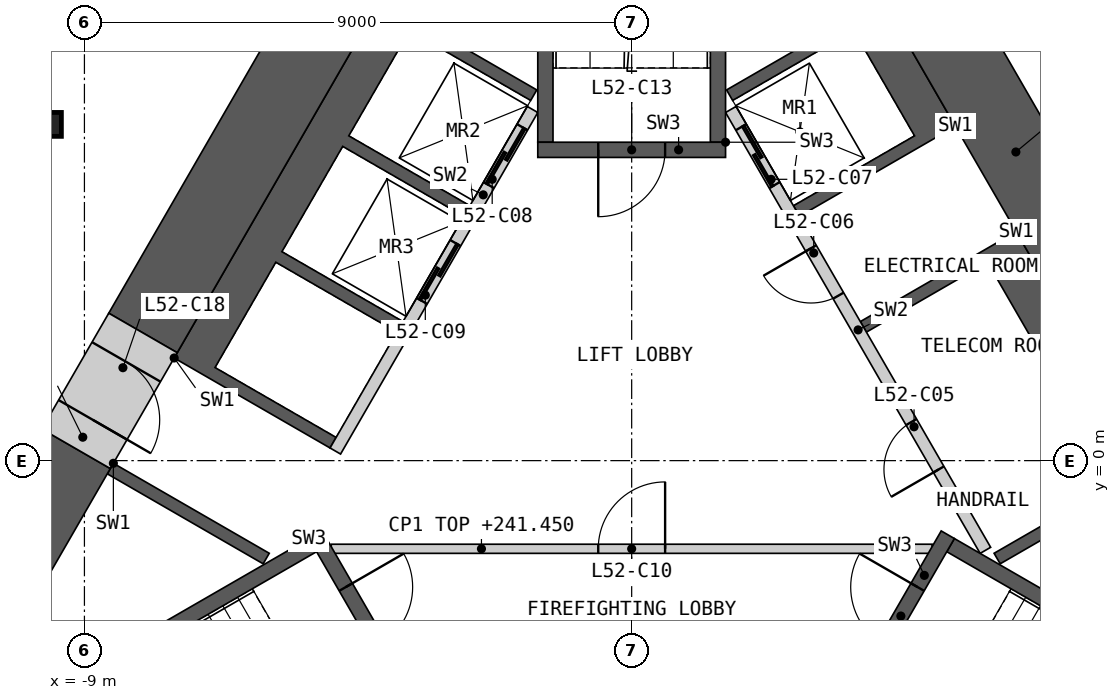
"""IFC4 building model, lengths in metres.
Left out: names, types, materials, properties, quantities, classifications, styles, units other than length and angle.
Written with IfcOpenShell. Run it as: python <this file> out.ifc"""

import sys

from ifc_helpers import new_model, si_unit, direction, frame, frame_2d, origin, origin_2d, place, context, subcontext, project, spatial, polyline, rectangle, i_section, outline, extrude, element, fill, save


model = new_model("IFC4")
c1 = context("Model", 3, precision=1e-05, world=origin(), true_north=direction((0.0, 1.0)))
c2 = subcontext(c1, "Body", "Model", "MODEL_VIEW")
j1 = project(units=[si_unit("LENGTHUNIT", "METRE"), si_unit("PLANEANGLEUNIT", "RADIAN")], contexts=[c1])
p1 = place(None, origin())
s1 = spatial("IfcSite", under=j1, at=p1, CompositionType="ELEMENT")
p2 = place(p1, origin())
s2 = spatial("IfcBuilding", under=s1, at=p2, CompositionType="ELEMENT")
p3 = place(p2, frame((0.0, 0.0, 238.2)))
s3 = spatial("IfcBuildingStorey", under=s2, at=p3, CompositionType="ELEMENT", Elevation=238.2)
p4 = place(p3, frame((-9.578, 5.53, 0.0), z_axis=(0.0, 0.0, 1.0), x_axis=(1.0, 0.0, 0.0)))
e1 = element("IfcColumn", 1, at=p4, inside=s3, PredefinedType="COLUMN", context=c2, shape_type="SweptSolid", body=[
    extrude(i_section(OverallWidth=0.399, OverallDepth=0.393, WebThickness=0.023, FlangeThickness=0.037, at=origin_2d()), origin(), (0.0, 0.0, 1.0), 3.6),
])
p5 = place(p3, origin())
e2 = element("IfcWall", 2, at=p5, inside=s3, PredefinedType="SHEAR", context=c2, shape_type="SweptSolid", body=[
    extrude(outline(polyline([(6.324, 3.767), (8.624, -0.217), (8.231, -0.444), (6.061, -1.697), (5.96, -1.524), (7.952, -0.374), (5.852, 3.263), (3.861, 2.113), (3.76, 2.287), (5.931, 3.54), (6.324, 3.767)])), origin(), (0.0, 0.0, 1.0), 3.25),
])
p6 = place(p3, origin())
e3 = element("IfcWall", 3, at=p6, inside=s3, PredefinedType="SHEAR", context=c2, shape_type="SweptSolid", body=[
    extrude(outline(polyline([(5.324, 5.499), (4.931, 5.272), (2.76, 4.019), (2.66, 4.192), (4.652, 5.342), (3.652, 7.074), (1.66, 5.924), (1.561, 6.097), (3.731, 7.35), (4.124, 7.577), (5.324, 5.499)])), origin(), (0.0, 0.0, 1.0), 3.25),
])
p7 = place(p3, frame((5.817, -1.476, 0.0), z_axis=(0.0, 0.0, 1.0), x_axis=(-0.500002616675, 0.866023893041, 0.0)))
e4 = element("IfcWall", 4, at=p7, inside=s3, PredefinedType="SOLIDWALL", context=c2, shape_type="SweptSolid", body=[
    extrude(rectangle(XDim=8.373, YDim=0.2, at=frame_2d((4.187, 0.0))), origin(), (0.0, 0.0, 1.0), 3.25),
])
p8 = place(p7, frame((1.537, 0.0, 0.0)))
e5 = element("IfcOpeningElement", 5, at=p8, cuts=e4, PredefinedType="OPENING", context=c2, shape_type="SweptSolid", body=[
    extrude(rectangle(XDim=0.9, YDim=2.1, at=frame_2d((0.45, 1.05))), frame((0.0, 0.11, 0.0), z_axis=(0.0, -1.0, 0.0), x_axis=(1.0, 0.0, 0.0)), (0.0, 0.0, 1.0), 0.22),
])
p9 = place(p7, frame((4.837, 0.0, 0.0)))
e6 = element("IfcOpeningElement", 6, at=p9, cuts=e4, PredefinedType="OPENING", context=c2, shape_type="SweptSolid", body=[
    extrude(rectangle(XDim=0.9, YDim=2.1, at=frame_2d((0.45, 1.05))), frame((0.0, 0.11, 0.0), z_axis=(0.0, -1.0, 0.0), x_axis=(1.0, 0.0, 0.0)), (0.0, 0.0, 1.0), 0.22),
])
p10 = place(p7, frame((6.937, 0.0, 0.0)))
e7 = element("IfcOpeningElement", 7, at=p10, cuts=e4, PredefinedType="OPENING", context=c2, shape_type="SweptSolid", body=[
    extrude(rectangle(XDim=1.1, YDim=2.1, at=frame_2d((0.55, 1.05))), frame((0.0, 0.11, 0.0), z_axis=(0.0, -1.0, 0.0), x_axis=(1.0, 0.0, 0.0)), (0.0, 0.0, 1.0), 0.22),
])
p11 = place(p3, origin())
e8 = element("IfcWall", 8, at=p11, inside=s3, PredefinedType="SHEAR", context=c2, shape_type="SweptSolid", body=[
    extrude(outline(polyline([(-7.524, 1.688), (-4.124, 7.577), (-3.731, 7.35), (-1.561, 6.097), (-1.66, 5.924), (-3.652, 7.074), (-4.652, 5.342), (-2.66, 4.192), (-2.76, 4.019), (-4.752, 5.169), (-5.752, 3.437), (-3.76, 2.287), (-3.861, 2.113), (-5.852, 3.263), (-6.852, 1.531), (-4.861, 0.381), (-4.96, 0.208), (-7.131, 1.461), (-7.524, 1.688)])), origin(), (0.0, 0.0, 1.0), 3.25),
])
p12 = place(p3, origin())
e9 = element("IfcWall", 9, at=p12, inside=s3, PredefinedType="SHEAR", context=c2, shape_type="SweptSolid", body=[
    extrude(outline(polyline([(-8.524, -0.044), (-8.131, -0.271), (-5.96, -1.524), (-6.061, -1.697), (-8.231, -0.444), (-8.624, -0.217), (-8.524, -0.044)])), origin(), (0.0, 0.0, 1.0), 3.25),
])
p13 = place(p3, frame((-1.631, 5.776, 0.0), z_axis=(0.0, 0.0, 1.0), x_axis=(-0.499992876559, -0.866029516466, 0.0)))
e10 = element("IfcWall", 10, at=p13, inside=s3, PredefinedType="SOLIDWALL", context=c2, shape_type="SweptSolid", body=[
    extrude(rectangle(XDim=6.486, YDim=0.2, at=frame_2d((3.243, 0.0))), origin(), (0.0, 0.0, 1.0), 3.25),
])
p14 = place(p13, frame((0.337, 0.0, 0.0)))
e11 = element("IfcOpeningElement", 11, at=p14, cuts=e10, PredefinedType="OPENING", context=c2, shape_type="SweptSolid", body=[
    extrude(rectangle(XDim=1.1, YDim=2.1, at=frame_2d((0.55, 1.05))), frame((0.0, 0.11, 0.0), z_axis=(0.0, -1.0, 0.0), x_axis=(1.0, 0.0, 0.0)), (0.0, 0.0, 1.0), 0.22),
])
p15 = place(p13, frame((2.537, 0.0, 0.0)))
e12 = element("IfcOpeningElement", 12, at=p15, cuts=e10, PredefinedType="OPENING", context=c2, shape_type="SweptSolid", body=[
    extrude(rectangle(XDim=1.1, YDim=2.1, at=frame_2d((0.55, 1.05))), frame((0.0, 0.11, 0.0), z_axis=(0.0, -1.0, 0.0), x_axis=(1.0, 0.0, 0.0)), (0.0, 0.0, 1.0), 0.22),
])
p16 = place(p3, frame((-4.941, -1.45, 0.0), z_axis=(0.0, 0.0, 1.0), x_axis=(1.0, 0.0, 0.0)))
e13 = element("IfcWall", 13, at=p16, inside=s3, PredefinedType="PARTITIONING", context=c2, shape_type="SweptSolid", body=[
    extrude(rectangle(XDim=9.882, YDim=0.15, at=frame_2d((4.941, 0.0))), origin(), (0.0, 0.0, 1.0), 3.25),
])
p17 = place(p16, frame((4.391, 0.0, 0.0)))
e14 = element("IfcOpeningElement", 14, at=p17, cuts=e13, PredefinedType="OPENING", context=c2, shape_type="SweptSolid", body=[
    extrude(rectangle(XDim=1.1, YDim=2.1, at=frame_2d((0.55, 1.05))), frame((0.0, 0.085, 0.0), z_axis=(0.0, -1.0, 0.0), x_axis=(1.0, 0.0, 0.0)), (0.0, 0.0, 1.0), 0.17),
])
p18 = place(p3, origin())
e15 = element("IfcWall", 15, at=p18, inside=s3, PredefinedType="SHEAR", context=c2, shape_type="SweptSolid", body=[
    extrude(outline(polyline([(-5.307, -1.281), (-10.374, -4.206), (-10.032, -4.298), (-5.182, -1.498), (-5.307, -1.281)])), origin(), (0.0, 0.0, 1.0), 3.25),
])
p19 = place(p3, frame((-5.199, -1.219, 0.0), z_axis=(0.0, 0.0, 1.0), x_axis=(0.499982516597, -0.866035497597, 0.0)))
e16 = element("IfcWall", 16, at=p19, inside=s3, PredefinedType="SHEAR", context=c2, shape_type="SweptSolid", body=[
    extrude(rectangle(XDim=3.088, YDim=0.25, at=frame_2d((1.544, 0.0))), origin(), (0.0, 0.0, 1.0), 3.25),
])
p20 = place(p19, frame((0.994, 0.0, 0.0)))
e17 = element("IfcOpeningElement", 17, at=p20, cuts=e16, PredefinedType="OPENING", context=c2, shape_type="SweptSolid", body=[
    extrude(rectangle(XDim=1.1, YDim=2.1, at=frame_2d((0.55, 1.05))), frame((0.0, 0.135, 0.0), z_axis=(0.0, -1.0, 0.0), x_axis=(1.0, 0.0, 0.0)), (0.0, 0.0, 1.0), 0.27),
])
p21 = place(p3, origin())
e18 = element("IfcWall", 18, at=p21, inside=s3, PredefinedType="SHEAR", context=c2, shape_type="SweptSolid", body=[
    extrude(outline(polyline([(10.032, -4.298), (10.374, -4.206), (5.307, -1.281), (5.182, -1.498), (10.032, -4.298)])), origin(), (0.0, 0.0, 1.0), 3.25),
])
p22 = place(p3, frame((3.655, -3.893, 0.0), z_axis=(0.0, 0.0, 1.0), x_axis=(0.499982516597, 0.866035497597, 0.0)))
e19 = element("IfcWall", 19, at=p22, inside=s3, PredefinedType="SHEAR", context=c2, shape_type="SweptSolid", body=[
    extrude(rectangle(XDim=3.088, YDim=0.25, at=frame_2d((1.544, 0.0))), origin(), (0.0, 0.0, 1.0), 3.25),
])
p23 = place(p22, frame((0.994, 0.0, 0.0)))
e20 = element("IfcOpeningElement", 20, at=p23, cuts=e19, PredefinedType="OPENING", context=c2, shape_type="SweptSolid", body=[
    extrude(rectangle(XDim=1.1, YDim=2.1, at=frame_2d((0.55, 1.05))), frame((0.0, 0.135, 0.0), z_axis=(0.0, -1.0, 0.0), x_axis=(1.0, 0.0, 0.0)), (0.0, 0.0, 1.0), 0.27),
])
p24 = place(p3, origin())
e21 = element("IfcWall", 21, at=p24, inside=s3, PredefinedType="SHEAR", context=c2, shape_type="SweptSolid", body=[
    extrude(outline(polyline([(1.544, 5.237), (1.544, 11.087), (1.294, 10.837), (1.294, 5.237), (1.544, 5.237)])), origin(), (0.0, 0.0, 1.0), 3.25),
])
p25 = place(p3, origin())
e22 = element("IfcWall", 22, at=p25, inside=s3, PredefinedType="SHEAR", context=c2, shape_type="SweptSolid", body=[
    extrude(outline(polyline([(-1.294, 10.837), (-1.544, 11.087), (-1.544, 5.237), (-1.294, 5.237), (-1.294, 10.837)])), origin(), (0.0, 0.0, 1.0), 3.25),
])
p26 = place(p3, frame((1.544, 5.112, 0.0), z_axis=(0.0, 0.0, 1.0), x_axis=(-1.0, 0.0, 0.0)))
e23 = element("IfcWall", 23, at=p26, inside=s3, PredefinedType="SHEAR", context=c2, shape_type="SweptSolid", body=[
    extrude(rectangle(XDim=3.088, YDim=0.25, at=frame_2d((1.544, 0.0))), origin(), (0.0, 0.0, 1.0), 3.25),
])
p27 = place(p26, frame((0.994, 0.0, 0.0)))
e24 = element("IfcOpeningElement", 24, at=p27, cuts=e23, PredefinedType="OPENING", context=c2, shape_type="SweptSolid", body=[
    extrude(rectangle(XDim=1.1, YDim=2.1, at=frame_2d((0.55, 1.05))), frame((0.0, 0.135, 0.0), z_axis=(0.0, -1.0, 0.0), x_axis=(1.0, 0.0, 0.0)), (0.0, 0.0, 1.0), 0.27),
])
p28 = place(p3, frame((10.081, -1.441, 0.0), z_axis=(0.0, 0.0, 1.0), x_axis=(-0.500012180433, 0.866018371294, 0.0)))
e25 = element("IfcWall", 25, at=p28, inside=s3, PredefinedType="SHEAR", context=c2, shape_type="SweptSolid", body=[
    extrude(rectangle(XDim=15.05, YDim=1.3, at=frame_2d((7.525, 0.0))), origin(), (0.0, 0.0, 1.0), 3.25),
])
p29 = place(p3, frame((-4.636, 7.99, 0.0), z_axis=(0.0, 0.0, 1.0), x_axis=(-0.500022813292, -0.866012232124, 0.0)))
e26 = element("IfcWall", 26, at=p29, inside=s3, PredefinedType="SHEAR", context=c2, shape_type="SweptSolid", body=[
    extrude(rectangle(XDim=6.802, YDim=1.3, at=frame_2d((3.401, 0.0))), origin(), (0.0, 0.0, 1.0), 3.25),
])
p30 = place(p3, frame((-9.137, 0.195, 0.0), z_axis=(0.0, 0.0, 1.0), x_axis=(-0.499985697398, -0.866033661238, 0.0)))
e27 = element("IfcWall", 27, at=p30, inside=s3, PredefinedType="SHEAR", context=c2, shape_type="SweptSolid", body=[
    extrude(rectangle(XDim=4.362, YDim=1.3, at=frame_2d((2.181, 0.0))), origin(), (0.0, 0.0, 1.0), 3.25),
])
p31 = place(p3, frame((-8.037, 2.1, 0.0), z_axis=(0.0, 0.0, 1.0), x_axis=(-0.50002983664, -0.866008176907, 0.0)))
e28 = element("IfcWall", 28, at=p31, inside=s3, PredefinedType="SHEAR", context=c2, shape_type="SweptSolid", body=[
    extrude(rectangle(XDim=2.2, YDim=1.3, at=frame_2d((1.1, 0.0))), origin(), (0.0, 0.0, 1.0), 3.25),
])
p32 = place(p31, frame((0.55, 0.0, 0.0)))
e29 = element("IfcOpeningElement", 29, at=p32, cuts=e28, PredefinedType="OPENING", context=c2, shape_type="SweptSolid", body=[
    extrude(rectangle(XDim=1.1, YDim=2.1, at=frame_2d((0.55, 1.05))), frame((0.0, 0.66, 0.0), z_axis=(0.0, -1.0, 0.0), x_axis=(1.0, 0.0, 0.0)), (0.0, 0.0, 1.0), 1.32),
])
p33 = place(p3, frame((-18.976, -4.747, 0.0), z_axis=(0.0, 0.0, 1.0), x_axis=(0.499999852422, 0.866025488988, 0.0)))
e30 = element("IfcWall", 30, at=p33, inside=s3, PredefinedType="PARTITIONING", context=c2, shape_type="SweptSolid", body=[
    extrude(rectangle(XDim=27.198, YDim=0.2, at=frame_2d((13.599, 0.0))), origin(), (0.0, 0.0, 1.0), 3.25),
])
p34 = place(p33, frame((25.346, 0.0, 0.0)))
e31 = element("IfcOpeningElement", 31, at=p34, cuts=e30, PredefinedType="OPENING", context=c2, shape_type="SweptSolid", body=[
    extrude(rectangle(XDim=1.1, YDim=2.1, at=frame_2d((0.55, 1.05))), frame((0.0, 0.11, 0.0), z_axis=(0.0, -1.0, 0.0), x_axis=(1.0, 0.0, 0.0)), (0.0, 0.0, 1.0), 0.22),
])
p35 = place(p33, frame((16.713, 0.0, 0.0)))
e32 = element("IfcOpeningElement", 32, at=p35, cuts=e30, PredefinedType="OPENING", context=c2, shape_type="SweptSolid", body=[
    extrude(rectangle(XDim=1.1, YDim=2.1, at=frame_2d((0.55, 1.05))), frame((0.0, 0.11, 0.0), z_axis=(0.0, -1.0, 0.0), x_axis=(1.0, 0.0, 0.0)), (0.0, 0.0, 1.0), 0.22),
])
p36 = place(p33, frame((0.35, 0.0, 0.0)))
e33 = element("IfcOpeningElement", 33, at=p36, cuts=e30, PredefinedType="OPENING", context=c2, shape_type="SweptSolid", body=[
    extrude(rectangle(XDim=1.1, YDim=2.1, at=frame_2d((0.55, 1.05))), frame((0.0, 0.11, 0.0), z_axis=(0.0, -1.0, 0.0), x_axis=(1.0, 0.0, 0.0)), (0.0, 0.0, 1.0), 0.22),
])
p37 = place(p3, frame((4.91, 13.616, 0.0), z_axis=(0.0, 0.0, 1.0), x_axis=(0.50000207303, -0.866024206917, 0.0)))
e34 = element("IfcWall", 34, at=p37, inside=s3, PredefinedType="PARTITIONING", context=c2, shape_type="SweptSolid", body=[
    extrude(rectangle(XDim=9.095, YDim=0.2, at=frame_2d((4.547, 0.0))), origin(), (0.0, 0.0, 1.0), 3.25),
])
p38 = place(p8, origin())
e35 = element("IfcDoor", 35, at=p38, inside=s3, OperationType="SINGLE_SWING_LEFT", PredefinedType="DOOR", context=c2, shape_type="SweptSolid", body=[
    extrude(rectangle(XDim=0.9, YDim=2.1, at=frame_2d((0.45, 1.05))), frame((0.0, 0.025, 0.0), z_axis=(0.0, -1.0, 0.0), x_axis=(1.0, 0.0, 0.0)), (0.0, 0.0, 1.0), 0.05),
])
fill(e5, e35)
p39 = place(p9, origin())
e36 = element("IfcDoor", 36, at=p39, inside=s3, OperationType="SINGLE_SWING_RIGHT", PredefinedType="DOOR", context=c2, shape_type="SweptSolid", body=[
    extrude(rectangle(XDim=0.9, YDim=2.1, at=frame_2d((0.45, 1.05))), frame((0.0, 0.025, 0.0), z_axis=(0.0, -1.0, 0.0), x_axis=(1.0, 0.0, 0.0)), (0.0, 0.0, 1.0), 0.05),
])
fill(e6, e36)
p40 = place(p10, origin())
e37 = element("IfcDoor", 37, at=p40, inside=s3, OperationType="SLIDING_TO_LEFT", PredefinedType="DOOR", context=c2, shape_type="SweptSolid", body=[
    extrude(rectangle(XDim=1.1, YDim=2.1, at=frame_2d((0.55, 1.05))), frame((0.0, 0.025, 0.0), z_axis=(0.0, -1.0, 0.0), x_axis=(1.0, 0.0, 0.0)), (0.0, 0.0, 1.0), 0.05),
])
fill(e7, e37)
p41 = place(p14, origin())
e38 = element("IfcDoor", 38, at=p41, inside=s3, OperationType="SLIDING_TO_LEFT", PredefinedType="DOOR", context=c2, shape_type="SweptSolid", body=[
    extrude(rectangle(XDim=1.1, YDim=2.1, at=frame_2d((0.55, 1.05))), frame((0.0, 0.025, 0.0), z_axis=(0.0, -1.0, 0.0), x_axis=(1.0, 0.0, 0.0)), (0.0, 0.0, 1.0), 0.05),
])
fill(e11, e38)
p42 = place(p15, origin())
e39 = element("IfcDoor", 39, at=p42, inside=s3, OperationType="SLIDING_TO_LEFT", PredefinedType="DOOR", context=c2, shape_type="SweptSolid", body=[
    extrude(rectangle(XDim=1.1, YDim=2.1, at=frame_2d((0.55, 1.05))), frame((0.0, 0.025, 0.0), z_axis=(0.0, -1.0, 0.0), x_axis=(1.0, 0.0, 0.0)), (0.0, 0.0, 1.0), 0.05),
])
fill(e12, e39)
p43 = place(p17, origin())
e40 = element("IfcDoor", 40, at=p43, inside=s3, OperationType="SINGLE_SWING_RIGHT", PredefinedType="DOOR", context=c2, shape_type="SweptSolid", body=[
    extrude(rectangle(XDim=1.1, YDim=2.1, at=frame_2d((0.55, 1.05))), frame((0.0, 0.025, 0.0), z_axis=(0.0, -1.0, 0.0), x_axis=(1.0, 0.0, 0.0)), (0.0, 0.0, 1.0), 0.05),
])
fill(e14, e40)
p44 = place(p20, origin())
e41 = element("IfcDoor", 41, at=p44, inside=s3, OperationType="SINGLE_SWING_LEFT", PredefinedType="DOOR", context=c2, shape_type="SweptSolid", body=[
    extrude(rectangle(XDim=1.1, YDim=2.1, at=frame_2d((0.55, 1.05))), frame((0.0, 0.025, 0.0), z_axis=(0.0, -1.0, 0.0), x_axis=(1.0, 0.0, 0.0)), (0.0, 0.0, 1.0), 0.05),
])
fill(e17, e41)
p45 = place(p23, origin())
e42 = element("IfcDoor", 42, at=p45, inside=s3, OperationType="SINGLE_SWING_RIGHT", PredefinedType="DOOR", context=c2, shape_type="SweptSolid", body=[
    extrude(rectangle(XDim=1.1, YDim=2.1, at=frame_2d((0.55, 1.05))), frame((0.0, 0.025, 0.0), z_axis=(0.0, -1.0, 0.0), x_axis=(1.0, 0.0, 0.0)), (0.0, 0.0, 1.0), 0.05),
])
fill(e20, e42)
p46 = place(p27, origin())
e43 = element("IfcDoor", 43, at=p46, inside=s3, OperationType="SINGLE_SWING_RIGHT", PredefinedType="DOOR", context=c2, shape_type="SweptSolid", body=[
    extrude(rectangle(XDim=1.1, YDim=2.1, at=frame_2d((0.55, 1.05))), frame((0.0, 0.025, 0.0), z_axis=(0.0, -1.0, 0.0), x_axis=(1.0, 0.0, 0.0)), (0.0, 0.0, 1.0), 0.05),
])
fill(e24, e43)
p47 = place(p32, origin())
e44 = element("IfcDoor", 44, at=p47, inside=s3, OperationType="SINGLE_SWING_RIGHT", PredefinedType="DOOR", context=c2, shape_type="SweptSolid", body=[
    extrude(rectangle(XDim=1.1, YDim=2.1, at=frame_2d((0.55, 1.05))), frame((0.0, 0.405, 0.0), z_axis=(0.0, -1.0, 0.0), x_axis=(1.0, 0.0, 0.0)), (0.0, 0.0, 1.0), 0.05),
])
fill(e29, e44)
save(model, sys.argv[1])
